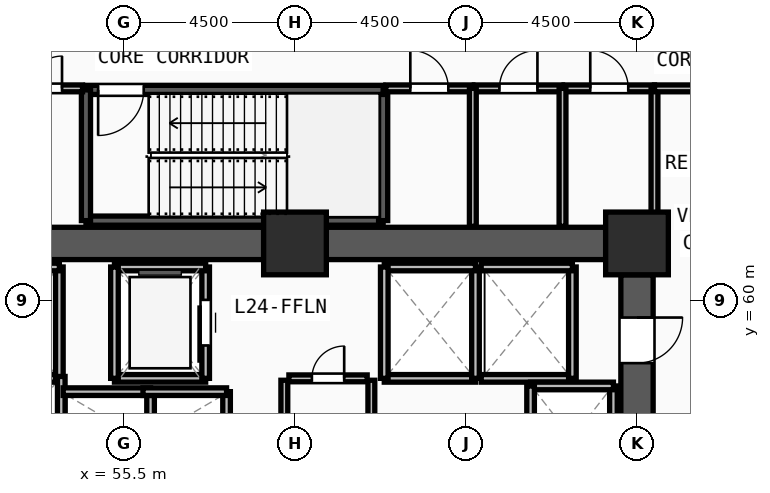
"""IFC4 building model, lengths in metres.
Left out: names, types, materials, properties, quantities, classifications, styles, units other than length and angle.
Written with IfcOpenShell. Run it as: python <this file> out.ifc"""

import sys

from ifc_helpers import new_model, si_unit, direction, frame, frame_2d, origin, origin_2d, place, context, subcontext, project, spatial, rectangle, extrude, source, transform, mapped, element, fill, save


model = new_model("IFC4")
c1 = context("Model", 3, precision=1e-05, world=origin(), true_north=direction((0.0, 1.0)))
c2 = subcontext(c1, "Body", "Model", "MODEL_VIEW")
j1 = project(units=[si_unit("LENGTHUNIT", "METRE"), si_unit("PLANEANGLEUNIT", "RADIAN")], contexts=[c1])
p1 = place(None, origin())
s1 = spatial("IfcSite", under=j1, at=p1, CompositionType="ELEMENT")
p2 = place(p1, origin())
s2 = spatial("IfcBuilding", under=s1, at=p2, CompositionType="ELEMENT")
p3 = place(p2, frame((0.0, 0.0, 93.0)))
s3 = spatial("IfcBuildingStorey", under=s2, at=p3, CompositionType="ELEMENT", Elevation=93.0)
m1 = source(origin(), c2, "Body", "SweptSolid", [
    extrude(rectangle(XDim=1.65, YDim=1.65, at=origin_2d()), origin(), (0.0, 0.0, 1.0), 4.5),
])
for number, where, z_axis, x_axis in (
    (1, (69.0, 61.5, 0.0), (0.0, 0.0, 1.0), (1.0, 0.0, 0.0)),
    (2, (60.0, 61.5, 0.0), (0.0, 0.0, 1.0), (1.0, 0.0, 0.0)),
):
    element("IfcColumn", number, at=place(p3, frame(where, z_axis=z_axis, x_axis=x_axis)), inside=s3, PredefinedType="COLUMN", context=c2, shape_type="MappedRepresentation", body=[
        mapped(m1, transform((0.0, 0.0, 0.0), x_axis=(1.0, 0.0, 0.0), y_axis=(0.0, 1.0, 0.0), z_axis=(0.0, 0.0, 1.0), scale=1.0)),
    ])
for number, where, z_axis, x_axis in (
    (3, (51.825, 61.5, 0.0), (0.0, 0.0, 1.0), (1.0, 0.0, 0.0)),
    (4, (60.825, 61.5, 0.0), (0.0, 0.0, 1.0), (1.0, 0.0, 0.0)),
):
    element("IfcWall", number, at=place(p3, frame(where, z_axis=z_axis, x_axis=x_axis)), inside=s3, PredefinedType="SHEAR", context=c2, shape_type="SweptSolid", body=[
        extrude(rectangle(XDim=7.35, YDim=0.85, at=frame_2d((3.675, 0.0))), origin(), (0.0, 0.0, 1.0), 4.22),
    ])
p4 = place(p3, frame((69.0, 60.675, 0.0), z_axis=(0.0, 0.0, 1.0), x_axis=(0.0, -1.0, 0.0)))
e5 = element("IfcWall", 5, at=p4, inside=s3, PredefinedType="SHEAR", context=c2, shape_type="SweptSolid", body=[
    extrude(rectangle(XDim=13.35, YDim=0.85, at=frame_2d((6.675, 0.0))), origin(), (0.0, 0.0, 1.0), 4.22),
])
m2 = source(origin(), c2, "Body", "SweptSolid", [
    extrude(rectangle(XDim=1.2, YDim=2.2, at=frame_2d((0.6, 1.1))), frame((0.0, 0.435, 0.0), z_axis=(0.0, -1.0, 0.0), x_axis=(1.0, 0.0, 0.0)), (0.0, 0.0, 1.0), 0.87),
])
p5 = place(p4, frame((1.125, 0.0, 0.0)))
e6 = element("IfcOpeningElement", 6, at=p5, cuts=e5, PredefinedType="OPENING", context=c2, shape_type="MappedRepresentation", body=[
    mapped(m2, transform((0.0, 0.0, 0.0), x_axis=(1.0, 0.0, 0.0), y_axis=(0.0, 1.0, 0.0), z_axis=(0.0, 0.0, 1.0), scale=1.0)),
])
p6 = place(p3, frame((54.5, 62.1, 0.0), z_axis=(0.0, 0.0, 1.0), x_axis=(1.0, 0.0, 0.0)))
e7 = element("IfcWall", 7, at=p6, inside=s3, PredefinedType="SOLIDWALL", context=c2, shape_type="SweptSolid", body=[
    extrude(rectangle(XDim=7.82, YDim=0.24, at=frame_2d((3.91, 0.0))), origin(), (0.0, 0.0, 1.0), 4.22),
])
p7 = place(p3, frame((62.32, 62.1, 0.0), z_axis=(0.0, 0.0, 1.0), x_axis=(0.0, 1.0, 0.0)))
e8 = element("IfcWall", 8, at=p7, inside=s3, PredefinedType="SOLIDWALL", context=c2, shape_type="SweptSolid", body=[
    extrude(rectangle(XDim=3.44, YDim=0.24, at=frame_2d((1.72, 0.0))), origin(), (0.0, 0.0, 1.0), 4.22),
])
p8 = place(p3, frame((62.32, 65.54, 0.0), z_axis=(0.0, 0.0, 1.0), x_axis=(-1.0, 0.0, 0.0)))
e9 = element("IfcWall", 9, at=p8, inside=s3, PredefinedType="SOLIDWALL", context=c2, shape_type="SweptSolid", body=[
    extrude(rectangle(XDim=7.82, YDim=0.24, at=frame_2d((3.91, 0.0))), origin(), (0.0, 0.0, 1.0), 4.22),
])
m3 = source(origin(), c2, "Body", "SweptSolid", [
    extrude(rectangle(XDim=1.2, YDim=2.2, at=frame_2d((0.6, 1.1))), frame((0.0, 0.13, 0.0), z_axis=(0.0, -1.0, 0.0), x_axis=(1.0, 0.0, 0.0)), (0.0, 0.0, 1.0), 0.26),
])
p9 = place(p8, frame((6.3, 0.0, 0.0)))
e10 = element("IfcOpeningElement", 10, at=p9, cuts=e9, PredefinedType="OPENING", context=c2, shape_type="MappedRepresentation", body=[
    mapped(m3, transform((0.0, 0.0, 0.0), x_axis=(1.0, 0.0, 0.0), y_axis=(0.0, 1.0, 0.0), z_axis=(0.0, 0.0, 1.0), scale=1.0)),
])
p10 = place(p3, frame((54.5, 65.54, 0.0), z_axis=(0.0, 0.0, 1.0), x_axis=(0.0, -1.0, 0.0)))
e11 = element("IfcWall", 11, at=p10, inside=s3, PredefinedType="SOLIDWALL", context=c2, shape_type="SweptSolid", body=[
    extrude(rectangle(XDim=3.44, YDim=0.24, at=frame_2d((1.72, 0.0))), origin(), (0.0, 0.0, 1.0), 4.22),
])
p11 = place(p3, frame((55.25, 57.95, 0.0), z_axis=(0.0, 0.0, 1.0), x_axis=(1.0, 0.0, 0.0)))
e12 = element("IfcWall", 12, at=p11, inside=s3, PredefinedType="SOLIDWALL", context=c2, shape_type="SweptSolid", body=[
    extrude(rectangle(XDim=2.4, YDim=0.2, at=frame_2d((1.2, 0.0))), origin(), (0.0, 0.0, 1.0), 4.22),
])
p12 = place(p3, frame((57.65, 57.95, 0.0), z_axis=(0.0, 0.0, 1.0), x_axis=(0.0, 1.0, 0.0)))
e13 = element("IfcWall", 13, at=p12, inside=s3, PredefinedType="SOLIDWALL", context=c2, shape_type="SweptSolid", body=[
    extrude(rectangle(XDim=2.93, YDim=0.2, at=frame_2d((1.465, 0.0))), origin(), (0.0, 0.0, 1.0), 4.22),
])
m4 = source(origin(), c2, "Body", "SweptSolid", [
    extrude(rectangle(XDim=1.2, YDim=2.3, at=frame_2d((0.6, 1.15))), frame((0.0, 0.11, 0.0), z_axis=(0.0, -1.0, 0.0), x_axis=(1.0, 0.0, 0.0)), (0.0, 0.0, 1.0), 0.22),
])
p13 = place(p12, frame((0.865, 0.0, 0.0)))
e14 = element("IfcOpeningElement", 14, at=p13, cuts=e13, PredefinedType="OPENING", context=c2, shape_type="MappedRepresentation", body=[
    mapped(m4, transform((0.0, 0.0, 0.0), x_axis=(1.0, 0.0, 0.0), y_axis=(0.0, 1.0, 0.0), z_axis=(0.0, 0.0, 1.0), scale=1.0)),
])
p14 = place(p3, frame((57.65, 60.88, 0.0), z_axis=(0.0, 0.0, 1.0), x_axis=(-1.0, 0.0, 0.0)))
e15 = element("IfcWall", 15, at=p14, inside=s3, PredefinedType="SOLIDWALL", context=c2, shape_type="SweptSolid", body=[
    extrude(rectangle(XDim=2.4, YDim=0.2, at=frame_2d((1.2, 0.0))), origin(), (0.0, 0.0, 1.0), 4.22),
])
p15 = place(p3, frame((55.25, 60.88, 0.0), z_axis=(0.0, 0.0, 1.0), x_axis=(0.0, -1.0, 0.0)))
e16 = element("IfcWall", 16, at=p15, inside=s3, PredefinedType="SOLIDWALL", context=c2, shape_type="SweptSolid", body=[
    extrude(rectangle(XDim=2.93, YDim=0.2, at=frame_2d((1.465, 0.0))), origin(), (0.0, 0.0, 1.0), 4.22),
])
p16 = place(p3, frame((62.35, 57.95, 0.0), z_axis=(0.0, 0.0, 1.0), x_axis=(1.0, 0.0, 0.0)))
e17 = element("IfcWall", 17, at=p16, inside=s3, PredefinedType="SOLIDWALL", context=c2, shape_type="SweptSolid", body=[
    extrude(rectangle(XDim=2.4, YDim=0.2, at=frame_2d((1.2, 0.0))), origin(), (0.0, 0.0, 1.0), 4.22),
])
p17 = place(p3, frame((64.75, 57.95, 0.0), z_axis=(0.0, 0.0, 1.0), x_axis=(0.0, 1.0, 0.0)))
e18 = element("IfcWall", 18, at=p17, inside=s3, PredefinedType="SOLIDWALL", context=c2, shape_type="SweptSolid", body=[
    extrude(rectangle(XDim=2.93, YDim=0.2, at=frame_2d((1.465, 0.0))), origin(), (0.0, 0.0, 1.0), 4.22),
])
p18 = place(p3, frame((64.75, 60.88, 0.0), z_axis=(0.0, 0.0, 1.0), x_axis=(-1.0, 0.0, 0.0)))
e19 = element("IfcWall", 19, at=p18, inside=s3, PredefinedType="SOLIDWALL", context=c2, shape_type="SweptSolid", body=[
    extrude(rectangle(XDim=2.4, YDim=0.2, at=frame_2d((1.2, 0.0))), origin(), (0.0, 0.0, 1.0), 4.22),
])
p19 = place(p3, frame((62.35, 60.88, 0.0), z_axis=(0.0, 0.0, 1.0), x_axis=(0.0, -1.0, 0.0)))
e20 = element("IfcWall", 20, at=p19, inside=s3, PredefinedType="SOLIDWALL", context=c2, shape_type="SweptSolid", body=[
    extrude(rectangle(XDim=2.93, YDim=0.2, at=frame_2d((1.465, 0.0))), origin(), (0.0, 0.0, 1.0), 4.22),
])
p20 = place(p3, frame((64.9, 57.95, 0.0), z_axis=(0.0, 0.0, 1.0), x_axis=(1.0, 0.0, 0.0)))
e21 = element("IfcWall", 21, at=p20, inside=s3, PredefinedType="SOLIDWALL", context=c2, shape_type="SweptSolid", body=[
    extrude(rectangle(XDim=2.4, YDim=0.2, at=frame_2d((1.2, 0.0))), origin(), (0.0, 0.0, 1.0), 4.22),
])
p21 = place(p3, frame((67.3, 57.95, 0.0), z_axis=(0.0, 0.0, 1.0), x_axis=(0.0, 1.0, 0.0)))
e22 = element("IfcWall", 22, at=p21, inside=s3, PredefinedType="SOLIDWALL", context=c2, shape_type="SweptSolid", body=[
    extrude(rectangle(XDim=2.93, YDim=0.2, at=frame_2d((1.465, 0.0))), origin(), (0.0, 0.0, 1.0), 4.22),
])
for number, where, z_axis, x_axis in (
    (23, (67.3, 60.88, 0.0), (0.0, 0.0, 1.0), (-1.0, 0.0, 0.0)),
    (24, (51.4, 57.95, 0.0), (0.0, 0.0, 1.0), (1.0, 0.0, 0.0)),
):
    element("IfcWall", number, at=place(p3, frame(where, z_axis=z_axis, x_axis=x_axis)), inside=s3, PredefinedType="SOLIDWALL", context=c2, shape_type="SweptSolid", body=[
        extrude(rectangle(XDim=2.4, YDim=0.2, at=frame_2d((1.2, 0.0))), origin(), (0.0, 0.0, 1.0), 4.22),
    ])
p22 = place(p3, frame((53.8, 57.95, 0.0), z_axis=(0.0, 0.0, 1.0), x_axis=(0.0, 1.0, 0.0)))
e25 = element("IfcWall", 25, at=p22, inside=s3, PredefinedType="SOLIDWALL", context=c2, shape_type="SweptSolid", body=[
    extrude(rectangle(XDim=2.93, YDim=0.2, at=frame_2d((1.465, 0.0))), origin(), (0.0, 0.0, 1.0), 4.22),
])
p23 = place(p3, frame((53.8, 60.88, 0.0), z_axis=(0.0, 0.0, 1.0), x_axis=(-1.0, 0.0, 0.0)))
e26 = element("IfcWall", 26, at=p23, inside=s3, PredefinedType="SOLIDWALL", context=c2, shape_type="SweptSolid", body=[
    extrude(rectangle(XDim=2.4, YDim=0.2, at=frame_2d((1.2, 0.0))), origin(), (0.0, 0.0, 1.0), 4.22),
])
p24 = place(p3, frame((53.85, 55.0, 0.0), z_axis=(0.0, 0.0, 1.0), x_axis=(0.0, 1.0, 0.0)))
e27 = element("IfcWall", 27, at=p24, inside=s3, PredefinedType="SOLIDWALL", context=c2, shape_type="SweptSolid", body=[
    extrude(rectangle(XDim=3.0, YDim=0.2, at=frame_2d((1.5, 0.0))), origin(), (0.0, 0.0, 1.0), 4.22),
])
p25 = place(p3, frame((68.38, 55.0, 0.0), z_axis=(0.0, 0.0, 1.0), x_axis=(0.0, 1.0, 0.0)))
e28 = element("IfcWall", 28, at=p25, inside=s3, PredefinedType="SOLIDWALL", context=c2, shape_type="SweptSolid", body=[
    extrude(rectangle(XDim=2.75, YDim=0.2, at=frame_2d((1.375, 0.0))), origin(), (0.0, 0.0, 1.0), 4.22),
])
p26 = place(p3, frame((68.38, 57.75, 0.0), z_axis=(0.0, 0.0, 1.0), x_axis=(-1.0, 0.0, 0.0)))
e29 = element("IfcWall", 29, at=p26, inside=s3, PredefinedType="SOLIDWALL", context=c2, shape_type="SweptSolid", body=[
    extrude(rectangle(XDim=2.18, YDim=0.2, at=frame_2d((1.09, 0.0))), origin(), (0.0, 0.0, 1.0), 4.22),
])
p27 = place(p3, frame((66.2, 57.75, 0.0), z_axis=(0.0, 0.0, 1.0), x_axis=(0.0, -1.0, 0.0)))
e30 = element("IfcWall", 30, at=p27, inside=s3, PredefinedType="SOLIDWALL", context=c2, shape_type="SweptSolid", body=[
    extrude(rectangle(XDim=2.75, YDim=0.2, at=frame_2d((1.375, 0.0))), origin(), (0.0, 0.0, 1.0), 4.22),
])
p28 = place(p3, frame((56.2, 55.0, 0.0), z_axis=(0.0, 0.0, 1.0), x_axis=(0.0, 1.0, 0.0)))
e31 = element("IfcWall", 31, at=p28, inside=s3, PredefinedType="SOLIDWALL", context=c2, shape_type="SweptSolid", body=[
    extrude(rectangle(XDim=2.6, YDim=0.2, at=frame_2d((1.3, 0.0))), origin(), (0.0, 0.0, 1.0), 4.22),
])
p29 = place(p3, frame((56.2, 57.6, 0.0), z_axis=(0.0, 0.0, 1.0), x_axis=(-1.0, 0.0, 0.0)))
e32 = element("IfcWall", 32, at=p29, inside=s3, PredefinedType="SOLIDWALL", context=c2, shape_type="SweptSolid", body=[
    extrude(rectangle(XDim=2.3, YDim=0.2, at=frame_2d((1.15, 0.0))), origin(), (0.0, 0.0, 1.0), 4.22),
])
p30 = place(p3, frame((58.2, 55.0, 0.0), z_axis=(0.0, 0.0, 1.0), x_axis=(0.0, 1.0, 0.0)))
e33 = element("IfcWall", 33, at=p30, inside=s3, PredefinedType="SOLIDWALL", context=c2, shape_type="SweptSolid", body=[
    extrude(rectangle(XDim=2.6, YDim=0.2, at=frame_2d((1.3, 0.0))), origin(), (0.0, 0.0, 1.0), 4.22),
])
p31 = place(p3, frame((58.2, 57.6, 0.0), z_axis=(0.0, 0.0, 1.0), x_axis=(-1.0, 0.0, 0.0)))
e34 = element("IfcWall", 34, at=p31, inside=s3, PredefinedType="SOLIDWALL", context=c2, shape_type="SweptSolid", body=[
    extrude(rectangle(XDim=2.2, YDim=0.2, at=frame_2d((1.1, 0.0))), origin(), (0.0, 0.0, 1.0), 4.22),
])
p32 = place(p3, frame((59.84, 57.95, 0.0), z_axis=(0.0, 0.0, 1.0), x_axis=(1.0, 0.0, 0.0)))
e35 = element("IfcWall", 35, at=p32, inside=s3, PredefinedType="PARTITIONING", context=c2, shape_type="SweptSolid", body=[
    extrude(rectangle(XDim=2.06, YDim=0.18, at=frame_2d((1.03, 0.0))), origin(), (0.0, 0.0, 1.0), 4.22),
])
m5 = source(origin(), c2, "Body", "SweptSolid", [
    extrude(rectangle(XDim=0.85, YDim=2.1, at=frame_2d((0.425, 1.05))), frame((0.0, 0.1, 0.0), z_axis=(0.0, -1.0, 0.0), x_axis=(1.0, 0.0, 0.0)), (0.0, 0.0, 1.0), 0.2),
])
p33 = place(p32, frame((0.605, 0.0, 0.0)))
e36 = element("IfcOpeningElement", 36, at=p33, cuts=e35, PredefinedType="OPENING", context=c2, shape_type="MappedRepresentation", body=[
    mapped(m5, transform((0.0, 0.0, 0.0), x_axis=(1.0, 0.0, 0.0), y_axis=(0.0, 1.0, 0.0), z_axis=(0.0, 0.0, 1.0), scale=1.0)),
])
p34 = place(p3, frame((52.48, 65.58, 0.0), z_axis=(0.0, 0.0, 1.0), x_axis=(1.0, 0.0, 0.0)))
e37 = element("IfcWall", 37, at=p34, inside=s3, PredefinedType="PARTITIONING", context=c2, shape_type="SweptSolid", body=[
    extrude(rectangle(XDim=1.93, YDim=0.18, at=frame_2d((0.965, 0.0))), origin(), (0.0, 0.0, 1.0), 4.22),
])
p35 = place(p34, frame((0.54, 0.0, 0.0)))
e38 = element("IfcOpeningElement", 38, at=p35, cuts=e37, PredefinedType="OPENING", context=c2, shape_type="MappedRepresentation", body=[
    mapped(m5, transform((0.0, 0.0, 0.0), x_axis=(1.0, 0.0, 0.0), y_axis=(0.0, 1.0, 0.0), z_axis=(0.0, 0.0, 1.0), scale=1.0)),
])
p36 = place(p3, frame((62.39, 65.58, 0.0), z_axis=(0.0, 0.0, 1.0), x_axis=(1.0, 0.0, 0.0)))
e39 = element("IfcWall", 39, at=p36, inside=s3, PredefinedType="PARTITIONING", context=c2, shape_type="SweptSolid", body=[
    extrude(rectangle(XDim=2.29, YDim=0.18, at=frame_2d((1.145, 0.0))), origin(), (0.0, 0.0, 1.0), 4.22),
])
m6 = source(origin(), c2, "Body", "SweptSolid", [
    extrude(rectangle(XDim=1.0, YDim=2.2, at=frame_2d((0.5, 1.1))), frame((0.0, 0.1, 0.0), z_axis=(0.0, -1.0, 0.0), x_axis=(1.0, 0.0, 0.0)), (0.0, 0.0, 1.0), 0.2),
])
p37 = place(p36, frame((0.645, 0.0, 0.0)))
e40 = element("IfcOpeningElement", 40, at=p37, cuts=e39, PredefinedType="OPENING", context=c2, shape_type="MappedRepresentation", body=[
    mapped(m6, transform((0.0, 0.0, 0.0), x_axis=(1.0, 0.0, 0.0), y_axis=(0.0, 1.0, 0.0), z_axis=(0.0, 0.0, 1.0), scale=1.0)),
])
p38 = place(p3, frame((64.72, 65.58, 0.0), z_axis=(0.0, 0.0, 1.0), x_axis=(1.0, 0.0, 0.0)))
e41 = element("IfcWall", 41, at=p38, inside=s3, PredefinedType="PARTITIONING", context=c2, shape_type="SweptSolid", body=[
    extrude(rectangle(XDim=2.32, YDim=0.18, at=frame_2d((1.16, 0.0))), origin(), (0.0, 0.0, 1.0), 4.22),
])
p39 = place(p38, frame((0.66, 0.0, 0.0)))
e42 = element("IfcOpeningElement", 42, at=p39, cuts=e41, PredefinedType="OPENING", context=c2, shape_type="MappedRepresentation", body=[
    mapped(m6, transform((0.0, 0.0, 0.0), x_axis=(1.0, 0.0, 0.0), y_axis=(0.0, 1.0, 0.0), z_axis=(0.0, 0.0, 1.0), scale=1.0)),
])
p40 = place(p3, frame((67.08, 65.58, 0.0), z_axis=(0.0, 0.0, 1.0), x_axis=(1.0, 0.0, 0.0)))
e43 = element("IfcWall", 43, at=p40, inside=s3, PredefinedType="PARTITIONING", context=c2, shape_type="SweptSolid", body=[
    extrude(rectangle(XDim=2.38, YDim=0.18, at=frame_2d((1.19, 0.0))), origin(), (0.0, 0.0, 1.0), 4.22),
])
p41 = place(p40, frame((0.69, 0.0, 0.0)))
e44 = element("IfcOpeningElement", 44, at=p41, cuts=e43, PredefinedType="OPENING", context=c2, shape_type="MappedRepresentation", body=[
    mapped(m6, transform((0.0, 0.0, 0.0), x_axis=(1.0, 0.0, 0.0), y_axis=(0.0, 1.0, 0.0), z_axis=(0.0, 0.0, 1.0), scale=1.0)),
])
for number, where, z_axis, x_axis in (
    (45, (59.72, 55.02, 0.0), (0.0, 0.0, 1.0), (0.0, 1.0, 0.0)),
    (46, (62.01, 55.02, 0.0), (0.0, 0.0, 1.0), (0.0, 1.0, 0.0)),
):
    element("IfcWall", number, at=place(p3, frame(where, z_axis=z_axis, x_axis=x_axis)), inside=s3, PredefinedType="PARTITIONING", context=c2, shape_type="SweptSolid", body=[
        extrude(rectangle(XDim=2.88, YDim=0.18, at=frame_2d((1.44, 0.0))), origin(), (0.0, 0.0, 1.0), 4.22),
    ])
for number, where, z_axis, x_axis in (
    (47, (64.68, 61.95, 0.0), (0.0, 0.0, 1.0), (0.0, 1.0, 0.0)),
    (48, (67.04, 61.95, 0.0), (0.0, 0.0, 1.0), (0.0, 1.0, 0.0)),
    (49, (69.46, 61.95, 0.0), (0.0, 0.0, 1.0), (0.0, 1.0, 0.0)),
):
    element("IfcWall", number, at=place(p3, frame(where, z_axis=z_axis, x_axis=x_axis)), inside=s3, PredefinedType="PARTITIONING", context=c2, shape_type="SweptSolid", body=[
        extrude(rectangle(XDim=3.63, YDim=0.18, at=frame_2d((1.815, 0.0))), origin(), (0.0, 0.0, 1.0), 4.22),
    ])
p42 = place(p3, frame((69.46, 65.58, 0.0), z_axis=(0.0, 0.0, 1.0), x_axis=(1.0, 0.0, 0.0)))
e50 = element("IfcWall", 50, at=p42, inside=s3, PredefinedType="PARTITIONING", context=c2, shape_type="SweptSolid", body=[
    extrude(rectangle(XDim=3.84, YDim=0.18, at=frame_2d((1.92, 0.0))), origin(), (0.0, 0.0, 1.0), 4.22),
])
m7 = source(origin(), c2, "Body", "SweptSolid", [
    extrude(rectangle(XDim=1.2, YDim=2.2, at=frame_2d((0.6, 1.1))), frame((0.0, 0.025, 0.0), z_axis=(0.0, -1.0, 0.0), x_axis=(1.0, 0.0, 0.0)), (0.0, 0.0, 1.0), 0.05),
])
p43 = place(p5, origin())
e51 = element("IfcDoor", 51, at=p43, inside=s3, OperationType="SINGLE_SWING_LEFT", PredefinedType="DOOR", context=c2, shape_type="MappedRepresentation", body=[
    mapped(m7, transform((0.0, 0.0, 0.0), x_axis=(1.0, 0.0, 0.0), y_axis=(0.0, 1.0, 0.0), z_axis=(0.0, 0.0, 1.0), scale=1.0)),
])
fill(e6, e51)
p44 = place(p9, origin())
e52 = element("IfcDoor", 52, at=p44, inside=s3, OperationType="SINGLE_SWING_RIGHT", PredefinedType="DOOR", context=c2, shape_type="MappedRepresentation", body=[
    mapped(m7, transform((0.0, 0.0, 0.0), x_axis=(1.0, 0.0, 0.0), y_axis=(0.0, 1.0, 0.0), z_axis=(0.0, 0.0, 1.0), scale=1.0)),
])
fill(e10, e52)
m8 = source(origin(), c2, "Body", "SweptSolid", [
    extrude(rectangle(XDim=1.2, YDim=2.3, at=frame_2d((0.6, 1.15))), frame((0.0, 0.025, 0.0), z_axis=(0.0, -1.0, 0.0), x_axis=(1.0, 0.0, 0.0)), (0.0, 0.0, 1.0), 0.05),
])
p45 = place(p13, origin())
e53 = element("IfcDoor", 53, at=p45, inside=s3, OperationType="SLIDING_TO_LEFT", PredefinedType="DOOR", context=c2, shape_type="MappedRepresentation", body=[
    mapped(m8, transform((0.0, 0.0, 0.0), x_axis=(1.0, 0.0, 0.0), y_axis=(0.0, 1.0, 0.0), z_axis=(0.0, 0.0, 1.0), scale=1.0)),
])
fill(e14, e53)
m9 = source(origin(), c2, "Body", "SweptSolid", [
    extrude(rectangle(XDim=0.85, YDim=2.1, at=frame_2d((0.425, 1.05))), frame((0.0, 0.025, 0.0), z_axis=(0.0, -1.0, 0.0), x_axis=(1.0, 0.0, 0.0)), (0.0, 0.0, 1.0), 0.05),
])
p46 = place(p33, origin())
e54 = element("IfcDoor", 54, at=p46, inside=s3, OperationType="SINGLE_SWING_RIGHT", PredefinedType="DOOR", context=c2, shape_type="MappedRepresentation", body=[
    mapped(m9, transform((0.0, 0.0, 0.0), x_axis=(1.0, 0.0, 0.0), y_axis=(0.0, 1.0, 0.0), z_axis=(0.0, 0.0, 1.0), scale=1.0)),
])
fill(e36, e54)
p47 = place(p35, origin())
e55 = element("IfcDoor", 55, at=p47, inside=s3, OperationType="SINGLE_SWING_RIGHT", PredefinedType="DOOR", context=c2, shape_type="MappedRepresentation", body=[
    mapped(m9, transform((0.0, 0.0, 0.0), x_axis=(1.0, 0.0, 0.0), y_axis=(0.0, 1.0, 0.0), z_axis=(0.0, 0.0, 1.0), scale=1.0)),
])
fill(e38, e55)
m10 = source(origin(), c2, "Body", "SweptSolid", [
    extrude(rectangle(XDim=1.0, YDim=2.2, at=frame_2d((0.5, 1.1))), frame((0.0, 0.025, 0.0), z_axis=(0.0, -1.0, 0.0), x_axis=(1.0, 0.0, 0.0)), (0.0, 0.0, 1.0), 0.05),
])
p48 = place(p37, origin())
e56 = element("IfcDoor", 56, at=p48, inside=s3, OperationType="SINGLE_SWING_LEFT", PredefinedType="DOOR", context=c2, shape_type="MappedRepresentation", body=[
    mapped(m10, transform((0.0, 0.0, 0.0), x_axis=(1.0, 0.0, 0.0), y_axis=(0.0, 1.0, 0.0), z_axis=(0.0, 0.0, 1.0), scale=1.0)),
])
fill(e40, e56)
p49 = place(p39, origin())
e57 = element("IfcDoor", 57, at=p49, inside=s3, OperationType="SINGLE_SWING_RIGHT", PredefinedType="DOOR", context=c2, shape_type="MappedRepresentation", body=[
    mapped(m10, transform((0.0, 0.0, 0.0), x_axis=(1.0, 0.0, 0.0), y_axis=(0.0, 1.0, 0.0), z_axis=(0.0, 0.0, 1.0), scale=1.0)),
])
fill(e42, e57)
p50 = place(p41, origin())
e58 = element("IfcDoor", 58, at=p50, inside=s3, OperationType="SINGLE_SWING_LEFT", PredefinedType="DOOR", context=c2, shape_type="MappedRepresentation", body=[
    mapped(m10, transform((0.0, 0.0, 0.0), x_axis=(1.0, 0.0, 0.0), y_axis=(0.0, 1.0, 0.0), z_axis=(0.0, 0.0, 1.0), scale=1.0)),
])
fill(e44, e58)
save(model, sys.argv[1])
